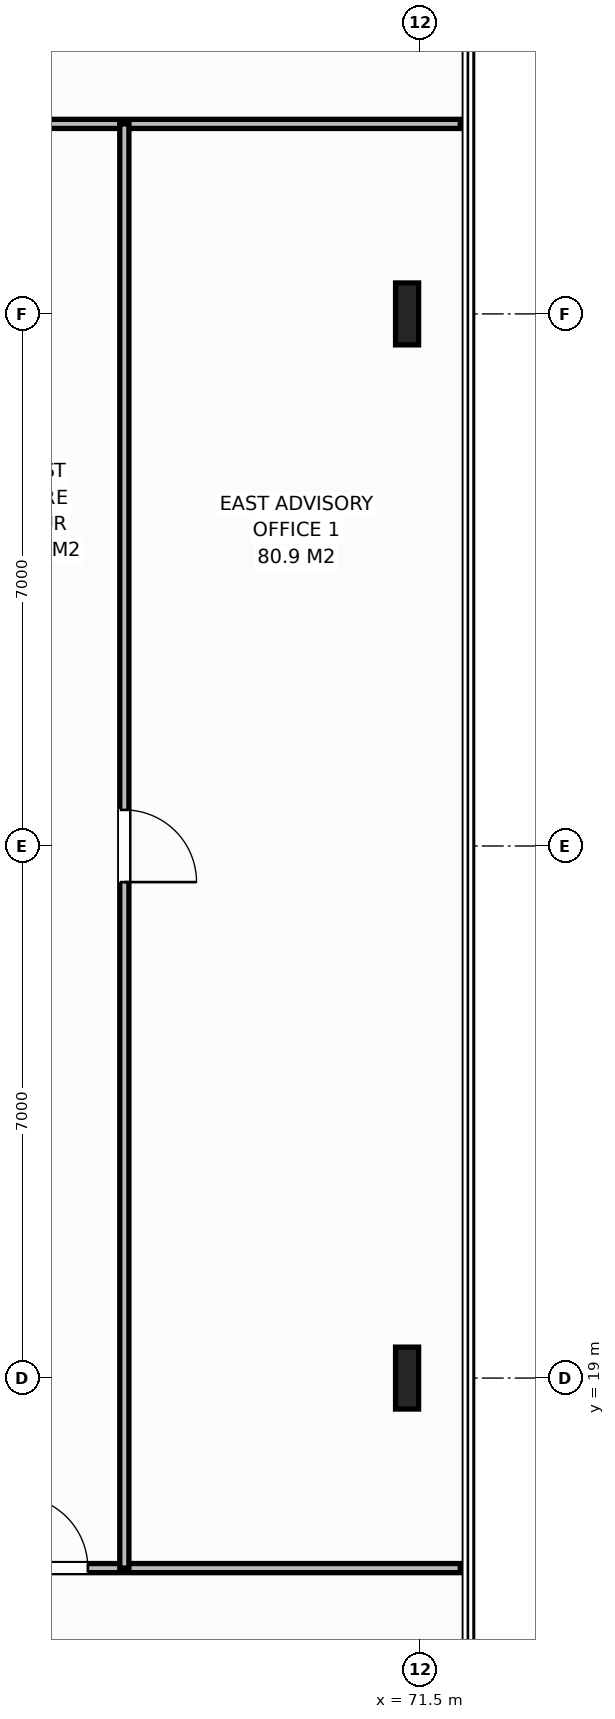
"""IFC4 building model, lengths in metres.
Left out: names, types, materials, properties, quantities, classifications, styles, units other than length and angle.
Written with IfcOpenShell. Run it as: python <this file> out.ifc"""

import sys

from ifc_helpers import new_model, si_unit, direction, frame, frame_2d, origin, origin_2d, place, context, subcontext, project, spatial, rectangle, i_section, extrude, element, fill, save


model = new_model("IFC4")
c1 = context("Model", 3, precision=1e-05, world=origin(), true_north=direction((0.0, 1.0)))
c2 = subcontext(c1, "Body", "Model", "MODEL_VIEW")
j1 = project(units=[si_unit("LENGTHUNIT", "METRE"), si_unit("PLANEANGLEUNIT", "RADIAN")], contexts=[c1])
p1 = place(None, origin())
s1 = spatial("IfcSite", under=j1, at=p1, CompositionType="ELEMENT")
p2 = place(p1, origin())
s2 = spatial("IfcBuilding", under=s1, at=p2, CompositionType="ELEMENT")
p3 = place(p2, frame((0.0, 0.0, 217.6)))
s3 = spatial("IfcBuildingStorey", under=s2, at=p3, CompositionType="ELEMENT", Elevation=217.6)
for number, where, z_axis, x_axis in (
    (1, (71.32, 19.0, 0.0), (0.0, 0.0, 1.0), (1.0, 0.0, 0.0)),
    (2, (71.32, 33.0, 0.0), (0.0, 0.0, 1.0), (1.0, 0.0, 0.0)),
):
    element("IfcColumn", number, at=place(p3, frame(where, z_axis=z_axis, x_axis=x_axis)), inside=s3, PredefinedType="COLUMN", context=c2, shape_type="SweptSolid", body=[
        extrude(i_section(OverallWidth=0.303, OverallDepth=0.814, WebThickness=0.021, FlangeThickness=0.04, at=origin_2d()), origin(), (0.0, 0.0, 1.0), 3.8),
    ])
p4 = place(p3, frame((59.691, 35.5, 0.0), z_axis=(0.0, 0.0, 1.0), x_axis=(1.0, 0.0, 0.0)))
e3 = element("IfcWall", 3, at=p4, inside=s3, PredefinedType="PARTITIONING", context=c2, shape_type="SweptSolid", body=[
    extrude(rectangle(XDim=12.329, YDim=0.12, at=frame_2d((6.165, 0.0))), origin(), (0.0, 0.0, 1.0), 3.58),
])
p5 = place(p4, frame((0.48, 0.0, 0.0)))
e4 = element("IfcOpeningElement", 4, at=p5, cuts=e3, PredefinedType="OPENING", context=c2, shape_type="SweptSolid", body=[
    extrude(rectangle(XDim=0.95, YDim=2.15, at=frame_2d((0.475, 1.075))), frame((0.0, 0.07, 0.0), z_axis=(0.0, -1.0, 0.0), x_axis=(1.0, 0.0, 0.0)), (0.0, 0.0, 1.0), 0.14),
])
p6 = place(p3, frame((64.86, 16.5, 0.0), z_axis=(0.0, 0.0, 1.0), x_axis=(1.0, 0.0, 0.0)))
e5 = element("IfcWall", 5, at=p6, inside=s3, PredefinedType="PARTITIONING", context=c2, shape_type="SweptSolid", body=[
    extrude(rectangle(XDim=7.16, YDim=0.12, at=frame_2d((3.58, 0.0))), origin(), (0.0, 0.0, 1.0), 3.58),
])
p7 = place(p6, frame((1.31, 0.0, 0.0)))
e6 = element("IfcOpeningElement", 6, at=p7, cuts=e5, PredefinedType="OPENING", context=c2, shape_type="SweptSolid", body=[
    extrude(rectangle(XDim=0.95, YDim=2.15, at=frame_2d((0.475, 1.075))), frame((0.0, 0.07, 0.0), z_axis=(0.0, -1.0, 0.0), x_axis=(1.0, 0.0, 0.0)), (0.0, 0.0, 1.0), 0.14),
])
p8 = place(p3, frame((67.6, 16.5, 0.0), z_axis=(0.0, 0.0, 1.0), x_axis=(0.0, 1.0, 0.0)))
e7 = element("IfcWall", 7, at=p8, inside=s3, PredefinedType="PARTITIONING", context=c2, shape_type="SweptSolid", body=[
    extrude(rectangle(XDim=19.0, YDim=0.12, at=frame_2d((9.5, 0.0))), origin(), (0.0, 0.0, 1.0), 3.58),
])
p9 = place(p8, frame((9.025, 0.0, 0.0)))
e8 = element("IfcOpeningElement", 8, at=p9, cuts=e7, PredefinedType="OPENING", context=c2, shape_type="SweptSolid", body=[
    extrude(rectangle(XDim=0.95, YDim=2.15, at=frame_2d((0.475, 1.075))), frame((0.0, 0.07, 0.0), z_axis=(0.0, -1.0, 0.0), x_axis=(1.0, 0.0, 0.0)), (0.0, 0.0, 1.0), 0.14),
])
p10 = place(p7, origin())
e9 = element("IfcDoor", 9, at=p10, inside=s3, OperationType="SINGLE_SWING_LEFT", PredefinedType="DOOR", context=c2, shape_type="SweptSolid", body=[
    extrude(rectangle(XDim=0.95, YDim=2.15, at=frame_2d((0.475, 1.075))), frame((0.0, 0.025, 0.0), z_axis=(0.0, -1.0, 0.0), x_axis=(1.0, 0.0, 0.0)), (0.0, 0.0, 1.0), 0.05),
])
fill(e6, e9)
p11 = place(p9, origin())
e10 = element("IfcDoor", 10, at=p11, inside=s3, OperationType="SINGLE_SWING_RIGHT", PredefinedType="DOOR", context=c2, shape_type="SweptSolid", body=[
    extrude(rectangle(XDim=0.95, YDim=2.15, at=frame_2d((0.475, 1.075))), frame((0.0, 0.025, 0.0), z_axis=(0.0, -1.0, 0.0), x_axis=(1.0, 0.0, 0.0)), (0.0, 0.0, 1.0), 0.05),
])
fill(e8, e10)
save(model, sys.argv[1])
